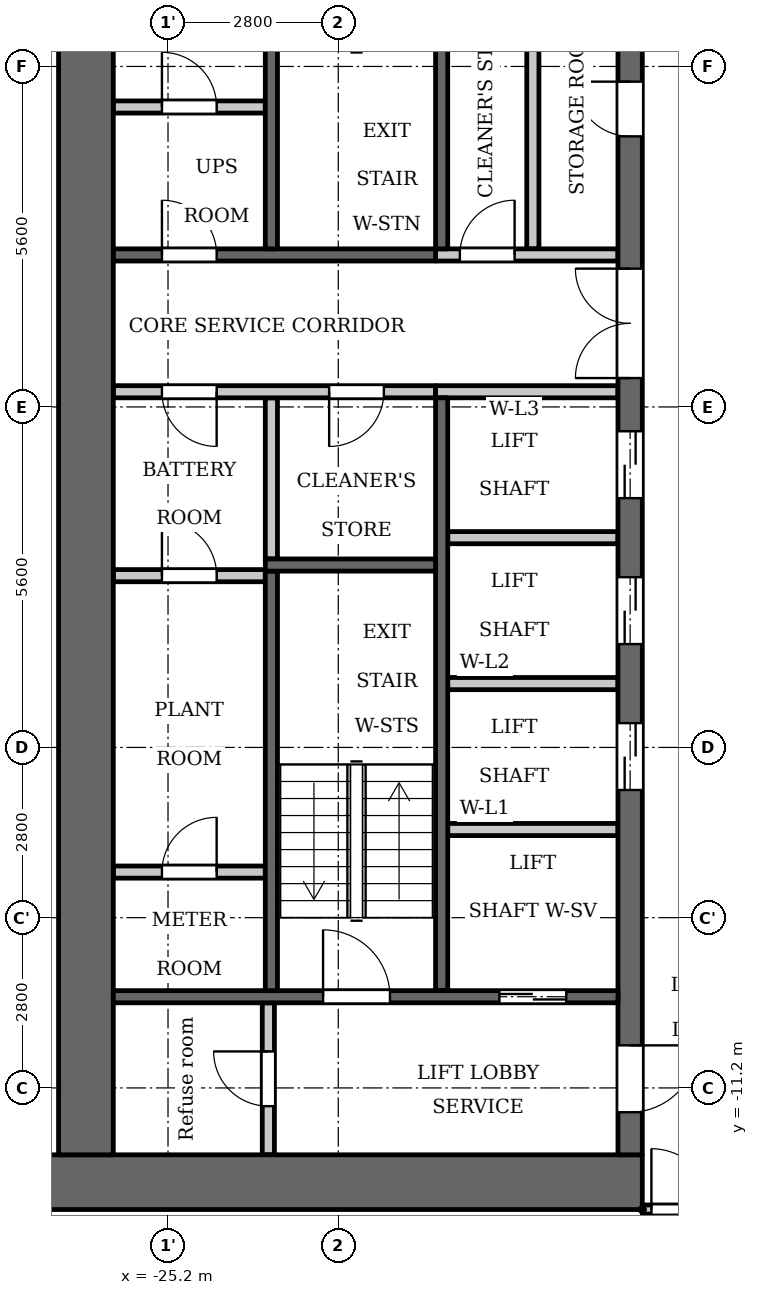
"""IFC4 building model, lengths in metres.
Left out: names, types, materials, properties, quantities, classifications, styles, units other than length and angle.
Written with IfcOpenShell. Run it as: python <this file> out.ifc"""

import sys

from ifc_helpers import new_model, si_unit, direction, frame, frame_2d, origin, place, context, subcontext, project, spatial, rectangle, extrude, element, fill, save


model = new_model("IFC4")
c1 = context("Model", 3, precision=1e-05, world=origin(), true_north=direction((0.0, 1.0)))
c2 = subcontext(c1, "Body", "Model", "MODEL_VIEW")
j1 = project(units=[si_unit("LENGTHUNIT", "METRE"), si_unit("PLANEANGLEUNIT", "RADIAN")], contexts=[c1])
p1 = place(None, origin())
s1 = spatial("IfcSite", under=j1, at=p1, CompositionType="ELEMENT")
p2 = place(p1, origin())
s2 = spatial("IfcBuilding", under=s1, at=p2, CompositionType="ELEMENT")
p3 = place(p2, frame((0.0, 0.0, 90.3)))
s3 = spatial("IfcBuildingStorey", under=s2, at=p3, CompositionType="ELEMENT", Elevation=90.3)
p4 = place(p3, frame((-23.5, -2.5, 0.0), z_axis=(0.0, 0.0, 1.0), x_axis=(0.0, 1.0, 0.0)))
e1 = element("IfcWall", 1, at=p4, inside=s3, PredefinedType="PARTITIONING", context=c2, shape_type="SweptSolid", body=[
    extrude(rectangle(XDim=2.65, YDim=0.2, at=frame_2d((1.325, 0.0))), origin(), (0.0, 0.0, 1.0), 3.2),
])
p5 = place(p3, frame((-20.7, 2.6, 0.0), z_axis=(0.0, 0.0, 1.0), x_axis=(0.0, 1.0, 0.0)))
e2 = element("IfcWall", 2, at=p5, inside=s3, PredefinedType="SHEAR", context=c2, shape_type="SweptSolid", body=[
    extrude(rectangle(XDim=7.0, YDim=0.2, at=frame_2d((3.5, 0.0))), origin(), (0.0, 0.0, 1.0), 3.2),
])
p6 = place(p3, frame((-20.7, -9.6, 0.0), z_axis=(0.0, 0.0, 1.0), x_axis=(0.0, 1.0, 0.0)))
e3 = element("IfcWall", 3, at=p6, inside=s3, PredefinedType="SHEAR", context=c2, shape_type="SweptSolid", body=[
    extrude(rectangle(XDim=9.75, YDim=0.2, at=frame_2d((4.875, 0.0))), origin(), (0.0, 0.0, 1.0), 3.2),
])
p7 = place(p3, frame((-20.8, 2.5, 0.0), z_axis=(0.0, 0.0, 1.0), x_axis=(-1.0, 0.0, 0.0)))
e4 = element("IfcWall", 4, at=p7, inside=s3, PredefinedType="SHEAR", context=c2, shape_type="SweptSolid", body=[
    extrude(rectangle(XDim=5.3, YDim=0.2, at=frame_2d((2.65, 0.0))), origin(), (0.0, 0.0, 1.0), 3.2),
])
p8 = place(p7, frame((3.6, 0.0, 0.0)))
e5 = element("IfcOpeningElement", 5, at=p8, cuts=e4, PredefinedType="OPENING", context=c2, shape_type="SweptSolid", body=[
    extrude(rectangle(XDim=0.9, YDim=2.1, at=frame_2d((0.45, 1.05))), frame((0.0, 0.11, 0.0), z_axis=(0.0, -1.0, 0.0), x_axis=(1.0, 0.0, 0.0)), (0.0, 0.0, 1.0), 0.22),
])
p9 = place(p3, frame((-20.8, 0.25, 0.0), z_axis=(0.0, 0.0, 1.0), x_axis=(-1.0, 0.0, 0.0)))
e6 = element("IfcWall", 6, at=p9, inside=s3, PredefinedType="PARTITIONING", context=c2, shape_type="SweptSolid", body=[
    extrude(rectangle(XDim=5.3, YDim=0.2, at=frame_2d((2.65, 0.0))), origin(), (0.0, 0.0, 1.0), 3.2),
])
p10 = place(p9, frame((0.85, 0.0, 0.0)))
e7 = element("IfcOpeningElement", 7, at=p10, cuts=e6, PredefinedType="OPENING", context=c2, shape_type="SweptSolid", body=[
    extrude(rectangle(XDim=0.9, YDim=2.1, at=frame_2d((0.45, 1.05))), frame((0.0, 0.11, 0.0), z_axis=(0.0, -1.0, 0.0), x_axis=(1.0, 0.0, 0.0)), (0.0, 0.0, 1.0), 0.22),
])
p11 = place(p9, frame((3.6, 0.0, 0.0)))
e8 = element("IfcOpeningElement", 8, at=p11, cuts=e6, PredefinedType="OPENING", context=c2, shape_type="SweptSolid", body=[
    extrude(rectangle(XDim=0.9, YDim=2.1, at=frame_2d((0.45, 1.05))), frame((0.0, 0.11, 0.0), z_axis=(0.0, -1.0, 0.0), x_axis=(1.0, 0.0, 0.0)), (0.0, 0.0, 1.0), 0.22),
])
p12 = place(p3, frame((-17.4, -12.75, 0.0), z_axis=(0.0, 0.0, 1.0), x_axis=(-1.0, 0.0, 0.0)))
e9 = element("IfcWall", 9, at=p12, inside=s3, PredefinedType="SHEAR", context=c2, shape_type="SweptSolid", body=[
    extrude(rectangle(XDim=10.4, YDim=0.9, at=frame_2d((5.2, 0.0))), origin(), (0.0, 0.0, 1.0), 3.2),
])
p13 = place(p3, frame((-19.2, 2.6, 0.0), z_axis=(0.0, 0.0, 1.0), x_axis=(0.0, 1.0, 0.0)))
e10 = element("IfcWall", 10, at=p13, inside=s3, PredefinedType="PARTITIONING", context=c2, shape_type="SweptSolid", body=[
    extrude(rectangle(XDim=4.6, YDim=0.2, at=frame_2d((2.3, 0.0))), origin(), (0.0, 0.0, 1.0), 3.2),
])
p14 = place(p3, frame((-17.6, -12.3, 0.0), z_axis=(0.0, 0.0, 1.0), x_axis=(0.0, 1.0, 0.0)))
e11 = element("IfcWall", 11, at=p14, inside=s3, PredefinedType="SHEAR", context=c2, shape_type="SweptSolid", body=[
    extrude(rectangle(XDim=24.6, YDim=0.4, at=frame_2d((12.3, 0.0))), origin(), (0.0, 0.0, 1.0), 3.2),
])
p15 = place(p14, frame((6.0, 0.0, 0.0)))
e12 = element("IfcOpeningElement", 12, at=p15, cuts=e11, PredefinedType="OPENING", context=c2, shape_type="SweptSolid", body=[
    extrude(rectangle(XDim=1.1, YDim=2.1, at=frame_2d((0.55, 1.05))), frame((0.0, 0.21, 0.0), z_axis=(0.0, -1.0, 0.0), x_axis=(1.0, 0.0, 0.0)), (0.0, 0.0, 1.0), 0.42),
])
p16 = place(p14, frame((8.4, 0.0, 0.0)))
e13 = element("IfcOpeningElement", 13, at=p16, cuts=e11, PredefinedType="OPENING", context=c2, shape_type="SweptSolid", body=[
    extrude(rectangle(XDim=1.1, YDim=2.1, at=frame_2d((0.55, 1.05))), frame((0.0, 0.21, 0.0), z_axis=(0.0, -1.0, 0.0), x_axis=(1.0, 0.0, 0.0)), (0.0, 0.0, 1.0), 0.42),
])
p17 = place(p14, frame((10.8, 0.0, 0.0)))
e14 = element("IfcOpeningElement", 14, at=p17, cuts=e11, PredefinedType="OPENING", context=c2, shape_type="SweptSolid", body=[
    extrude(rectangle(XDim=1.1, YDim=2.1, at=frame_2d((0.55, 1.05))), frame((0.0, 0.21, 0.0), z_axis=(0.0, -1.0, 0.0), x_axis=(1.0, 0.0, 0.0)), (0.0, 0.0, 1.0), 0.42),
])
p18 = place(p14, frame((16.75, 0.0, 0.0)))
e15 = element("IfcOpeningElement", 15, at=p18, cuts=e11, PredefinedType="OPENING", context=c2, shape_type="SweptSolid", body=[
    extrude(rectangle(XDim=0.9, YDim=2.1, at=frame_2d((0.45, 1.05))), frame((0.0, 0.21, 0.0), z_axis=(0.0, -1.0, 0.0), x_axis=(1.0, 0.0, 0.0)), (0.0, 0.0, 1.0), 0.42),
])
p19 = place(p14, frame((22.8, 0.0, 0.0)))
e16 = element("IfcOpeningElement", 16, at=p19, cuts=e11, PredefinedType="OPENING", context=c2, shape_type="SweptSolid", body=[
    extrude(rectangle(XDim=1.1, YDim=2.1, at=frame_2d((0.55, 1.05))), frame((0.0, 0.21, 0.0), z_axis=(0.0, -1.0, 0.0), x_axis=(1.0, 0.0, 0.0)), (0.0, 0.0, 1.0), 0.42),
])
p20 = place(p14, frame((0.7, 0.0, 0.0)))
e17 = element("IfcOpeningElement", 17, at=p20, cuts=e11, PredefinedType="OPENING", context=c2, shape_type="SweptSolid", body=[
    extrude(rectangle(XDim=1.1, YDim=2.1, at=frame_2d((0.55, 1.05))), frame((0.0, 0.21, 0.0), z_axis=(0.0, -1.0, 0.0), x_axis=(1.0, 0.0, 0.0)), (0.0, 0.0, 1.0), 0.42),
])
p21 = place(p14, frame((12.775, 0.0, 0.0)))
e18 = element("IfcOpeningElement", 18, at=p21, cuts=e11, PredefinedType="OPENING", context=c2, shape_type="SweptSolid", body=[
    extrude(rectangle(XDim=1.8, YDim=2.1, at=frame_2d((0.9, 1.05))), frame((0.0, 0.21, 0.0), z_axis=(0.0, -1.0, 0.0), x_axis=(1.0, 0.0, 0.0)), (0.0, 0.0, 1.0), 0.42),
])
p22 = place(p3, frame((-26.55, -12.3, 0.0), z_axis=(0.0, 0.0, 1.0), x_axis=(0.0, 1.0, 0.0)))
e19 = element("IfcWall", 19, at=p22, inside=s3, PredefinedType="SHEAR", context=c2, shape_type="SweptSolid", body=[
    extrude(rectangle(XDim=24.6, YDim=0.9, at=frame_2d((12.3, 0.0))), origin(), (0.0, 0.0, 1.0), 3.2),
])
p23 = place(p3, frame((-23.55, -12.3, 0.0), z_axis=(0.0, 0.0, 1.0), x_axis=(0.0, 1.0, 0.0)))
e20 = element("IfcWall", 20, at=p23, inside=s3, PredefinedType="PARTITIONING", context=c2, shape_type="SweptSolid", body=[
    extrude(rectangle(XDim=2.5, YDim=0.2, at=frame_2d((1.25, 0.0))), origin(), (0.0, 0.0, 1.0), 3.2),
])
p24 = place(p23, frame((0.8, 0.0, 0.0)))
e21 = element("IfcOpeningElement", 21, at=p24, cuts=e20, PredefinedType="OPENING", context=c2, shape_type="SweptSolid", body=[
    extrude(rectangle(XDim=0.9, YDim=2.1, at=frame_2d((0.45, 1.05))), frame((0.0, 0.11, 0.0), z_axis=(0.0, -1.0, 0.0), x_axis=(1.0, 0.0, 0.0)), (0.0, 0.0, 1.0), 0.22),
])
p25 = place(p3, frame((-23.6, -7.65, 0.0), z_axis=(0.0, 0.0, 1.0), x_axis=(-1.0, 0.0, 0.0)))
e22 = element("IfcWall", 22, at=p25, inside=s3, PredefinedType="PARTITIONING", context=c2, shape_type="SweptSolid", body=[
    extrude(rectangle(XDim=2.5, YDim=0.2, at=frame_2d((1.25, 0.0))), origin(), (0.0, 0.0, 1.0), 3.2),
])
p26 = place(p25, frame((0.8, 0.0, 0.0)))
e23 = element("IfcOpeningElement", 23, at=p26, cuts=e22, PredefinedType="OPENING", context=c2, shape_type="SweptSolid", body=[
    extrude(rectangle(XDim=0.9, YDim=2.1, at=frame_2d((0.45, 1.05))), frame((0.0, 0.11, 0.0), z_axis=(0.0, -1.0, 0.0), x_axis=(1.0, 0.0, 0.0)), (0.0, 0.0, 1.0), 0.22),
])
p27 = place(p3, frame((-23.6, -2.775, 0.0), z_axis=(0.0, 0.0, 1.0), x_axis=(-1.0, 0.0, 0.0)))
e24 = element("IfcWall", 24, at=p27, inside=s3, PredefinedType="PARTITIONING", context=c2, shape_type="SweptSolid", body=[
    extrude(rectangle(XDim=2.5, YDim=0.2, at=frame_2d((1.25, 0.0))), origin(), (0.0, 0.0, 1.0), 3.2),
])
p28 = place(p27, frame((0.8, 0.0, 0.0)))
e25 = element("IfcOpeningElement", 25, at=p28, cuts=e24, PredefinedType="OPENING", context=c2, shape_type="SweptSolid", body=[
    extrude(rectangle(XDim=0.9, YDim=2.1, at=frame_2d((0.45, 1.05))), frame((0.0, 0.11, 0.0), z_axis=(0.0, -1.0, 0.0), x_axis=(1.0, 0.0, 0.0)), (0.0, 0.0, 1.0), 0.22),
])
p29 = place(p3, frame((-23.6, 4.933, 0.0), z_axis=(0.0, 0.0, 1.0), x_axis=(-1.0, 0.0, 0.0)))
e26 = element("IfcWall", 26, at=p29, inside=s3, PredefinedType="PARTITIONING", context=c2, shape_type="SweptSolid", body=[
    extrude(rectangle(XDim=2.5, YDim=0.2, at=frame_2d((1.25, 0.0))), origin(), (0.0, 0.0, 1.0), 3.2),
])
p30 = place(p29, frame((0.8, 0.0, 0.0)))
e27 = element("IfcOpeningElement", 27, at=p30, cuts=e26, PredefinedType="OPENING", context=c2, shape_type="SweptSolid", body=[
    extrude(rectangle(XDim=0.9, YDim=2.1, at=frame_2d((0.45, 1.05))), frame((0.0, 0.11, 0.0), z_axis=(0.0, -1.0, 0.0), x_axis=(1.0, 0.0, 0.0)), (0.0, 0.0, 1.0), 0.22),
])
p31 = place(p3, frame((-17.8, -9.7, 0.0), z_axis=(0.0, 0.0, 1.0), x_axis=(-1.0, 0.0, 0.0)))
e28 = element("IfcWall", 28, at=p31, inside=s3, PredefinedType="SHEAR", context=c2, shape_type="SweptSolid", body=[
    extrude(rectangle(XDim=8.3, YDim=0.2, at=frame_2d((4.15, 0.0))), origin(), (0.0, 0.0, 1.0), 3.2),
])
p32 = place(p31, frame((0.85, 0.0, 0.0)))
e29 = element("IfcOpeningElement", 29, at=p32, cuts=e28, PredefinedType="OPENING", context=c2, shape_type="SweptSolid", body=[
    extrude(rectangle(XDim=1.1, YDim=2.1, at=frame_2d((0.55, 1.05))), frame((0.0, 0.11, 0.0), z_axis=(0.0, -1.0, 0.0), x_axis=(1.0, 0.0, 0.0)), (0.0, 0.0, 1.0), 0.22),
])
p33 = place(p31, frame((3.75, 0.0, 0.0)))
e30 = element("IfcOpeningElement", 30, at=p33, cuts=e28, PredefinedType="OPENING", context=c2, shape_type="SweptSolid", body=[
    extrude(rectangle(XDim=1.1, YDim=2.1, at=frame_2d((0.55, 1.05))), frame((0.0, 0.11, 0.0), z_axis=(0.0, -1.0, 0.0), x_axis=(1.0, 0.0, 0.0)), (0.0, 0.0, 1.0), 0.22),
])
for number, where, z_axis, x_axis in (
    (31, (-17.8, -6.95, 0.0), (0.0, 0.0, 1.0), (-1.0, 0.0, 0.0)),
    (32, (-17.8, -4.55, 0.0), (0.0, 0.0, 1.0), (-1.0, 0.0, 0.0)),
    (33, (-17.8, -2.15, 0.0), (0.0, 0.0, 1.0), (-1.0, 0.0, 0.0)),
):
    element("IfcWall", number, at=place(p3, frame(where, z_axis=z_axis, x_axis=x_axis)), inside=s3, PredefinedType="PARTITIONING", context=c2, shape_type="SweptSolid", body=[
        extrude(rectangle(XDim=2.8, YDim=0.2, at=frame_2d((1.4, 0.0))), origin(), (0.0, 0.0, 1.0), 3.2),
    ])
p34 = place(p3, frame((-17.8, 0.25, 0.0), z_axis=(0.0, 0.0, 1.0), x_axis=(-1.0, 0.0, 0.0)))
e34 = element("IfcWall", 34, at=p34, inside=s3, PredefinedType="PARTITIONING", context=c2, shape_type="SweptSolid", body=[
    extrude(rectangle(XDim=3.0, YDim=0.2, at=frame_2d((1.5, 0.0))), origin(), (0.0, 0.0, 1.0), 3.2),
])
p35 = place(p3, frame((-17.8, 2.5, 0.0), z_axis=(0.0, 0.0, 1.0), x_axis=(-1.0, 0.0, 0.0)))
e35 = element("IfcWall", 35, at=p35, inside=s3, PredefinedType="PARTITIONING", context=c2, shape_type="SweptSolid", body=[
    extrude(rectangle(XDim=3.0, YDim=0.2, at=frame_2d((1.5, 0.0))), origin(), (0.0, 0.0, 1.0), 3.2),
])
p36 = place(p35, frame((1.7, 0.0, 0.0)))
e36 = element("IfcOpeningElement", 36, at=p36, cuts=e35, PredefinedType="OPENING", context=c2, shape_type="SweptSolid", body=[
    extrude(rectangle(XDim=0.9, YDim=2.1, at=frame_2d((0.45, 1.05))), frame((0.0, 0.11, 0.0), z_axis=(0.0, -1.0, 0.0), x_axis=(1.0, 0.0, 0.0)), (0.0, 0.0, 1.0), 0.22),
])
p37 = place(p3, frame((-23.5, 2.6, 0.0), z_axis=(0.0, 0.0, 1.0), x_axis=(0.0, 1.0, 0.0)))
e37 = element("IfcWall", 37, at=p37, inside=s3, PredefinedType="SHEAR", context=c2, shape_type="SweptSolid", body=[
    extrude(rectangle(XDim=7.0, YDim=0.2, at=frame_2d((3.5, 0.0))), origin(), (0.0, 0.0, 1.0), 3.2),
])
p38 = place(p3, frame((-23.5, -9.6, 0.0), z_axis=(0.0, 0.0, 1.0), x_axis=(0.0, 1.0, 0.0)))
e38 = element("IfcWall", 38, at=p38, inside=s3, PredefinedType="SHEAR", context=c2, shape_type="SweptSolid", body=[
    extrude(rectangle(XDim=6.9, YDim=0.2, at=frame_2d((3.45, 0.0))), origin(), (0.0, 0.0, 1.0), 3.2),
])
p39 = place(p3, frame((-20.8, -2.6, 0.0), z_axis=(0.0, 0.0, 1.0), x_axis=(-1.0, 0.0, 0.0)))
e39 = element("IfcWall", 39, at=p39, inside=s3, PredefinedType="SHEAR", context=c2, shape_type="SweptSolid", body=[
    extrude(rectangle(XDim=2.8, YDim=0.2, at=frame_2d((1.4, 0.0))), origin(), (0.0, 0.0, 1.0), 3.2),
])
p40 = place(p3, frame((-17.4, -13.2, 0.0), z_axis=(0.0, 0.0, 1.0), x_axis=(1.0, 0.0, 0.0)))
e40 = element("IfcWall", 40, at=p40, inside=s3, PredefinedType="PARTITIONING", context=c2, shape_type="SweptSolid", body=[
    extrude(rectangle(XDim=34.8, YDim=0.15, at=frame_2d((17.4, 0.0))), origin(), (0.0, 0.0, 1.0), 3.2),
])
p41 = place(p40, frame((0.15, 0.0, 0.0)))
e41 = element("IfcOpeningElement", 41, at=p41, cuts=e40, PredefinedType="OPENING", context=c2, shape_type="SweptSolid", body=[
    extrude(rectangle(XDim=1.0, YDim=2.1, at=frame_2d((0.5, 1.05))), frame((0.0, 0.085, 0.0), z_axis=(0.0, -1.0, 0.0), x_axis=(1.0, 0.0, 0.0)), (0.0, 0.0, 1.0), 0.17),
])
p42 = place(p40, frame((33.55, 0.0, 0.0)))
e42 = element("IfcOpeningElement", 42, at=p42, cuts=e40, PredefinedType="OPENING", context=c2, shape_type="SweptSolid", body=[
    extrude(rectangle(XDim=1.0, YDim=2.1, at=frame_2d((0.5, 1.05))), frame((0.0, 0.085, 0.0), z_axis=(0.0, -1.0, 0.0), x_axis=(1.0, 0.0, 0.0)), (0.0, 0.0, 1.0), 0.17),
])
p43 = place(p40, frame((7.35, 0.0, 0.0)))
e43 = element("IfcOpeningElement", 43, at=p43, cuts=e40, PredefinedType="OPENING", context=c2, shape_type="SweptSolid", body=[
    extrude(rectangle(XDim=1.0, YDim=2.1, at=frame_2d((0.5, 1.05))), frame((0.0, 0.085, 0.0), z_axis=(0.0, -1.0, 0.0), x_axis=(1.0, 0.0, 0.0)), (0.0, 0.0, 1.0), 0.17),
])
p44 = place(p40, frame((13.7, 0.0, 0.0)))
e44 = element("IfcOpeningElement", 44, at=p44, cuts=e40, PredefinedType="OPENING", context=c2, shape_type="SweptSolid", body=[
    extrude(rectangle(XDim=1.0, YDim=2.1, at=frame_2d((0.5, 1.05))), frame((0.0, 0.085, 0.0), z_axis=(0.0, -1.0, 0.0), x_axis=(1.0, 0.0, 0.0)), (0.0, 0.0, 1.0), 0.17),
])
p45 = place(p40, frame((19.3, 0.0, 0.0)))
e45 = element("IfcOpeningElement", 45, at=p45, cuts=e40, PredefinedType="OPENING", context=c2, shape_type="SweptSolid", body=[
    extrude(rectangle(XDim=1.0, YDim=2.1, at=frame_2d((0.5, 1.05))), frame((0.0, 0.085, 0.0), z_axis=(0.0, -1.0, 0.0), x_axis=(1.0, 0.0, 0.0)), (0.0, 0.0, 1.0), 0.17),
])
p46 = place(p32, origin())
e46 = element("IfcDoor", 46, at=p46, inside=s3, OperationType="DOUBLE_DOOR_SLIDING", PredefinedType="DOOR", context=c2, shape_type="SweptSolid", body=[
    extrude(rectangle(XDim=1.1, YDim=2.1, at=frame_2d((0.55, 1.05))), frame((0.0, 0.025, 0.0), z_axis=(0.0, -1.0, 0.0), x_axis=(1.0, 0.0, 0.0)), (0.0, 0.0, 1.0), 0.05),
])
fill(e29, e46)
p47 = place(p15, origin())
e47 = element("IfcDoor", 47, at=p47, inside=s3, OperationType="DOUBLE_DOOR_SLIDING", PredefinedType="DOOR", context=c2, shape_type="SweptSolid", body=[
    extrude(rectangle(XDim=1.1, YDim=2.1, at=frame_2d((0.55, 1.05))), frame((0.0, 0.025, 0.0), z_axis=(0.0, -1.0, 0.0), x_axis=(1.0, 0.0, 0.0)), (0.0, 0.0, 1.0), 0.05),
])
fill(e12, e47)
p48 = place(p16, origin())
e48 = element("IfcDoor", 48, at=p48, inside=s3, OperationType="DOUBLE_DOOR_SLIDING", PredefinedType="DOOR", context=c2, shape_type="SweptSolid", body=[
    extrude(rectangle(XDim=1.1, YDim=2.1, at=frame_2d((0.55, 1.05))), frame((0.0, 0.025, 0.0), z_axis=(0.0, -1.0, 0.0), x_axis=(1.0, 0.0, 0.0)), (0.0, 0.0, 1.0), 0.05),
])
fill(e13, e48)
p49 = place(p17, origin())
e49 = element("IfcDoor", 49, at=p49, inside=s3, OperationType="DOUBLE_DOOR_SLIDING", PredefinedType="DOOR", context=c2, shape_type="SweptSolid", body=[
    extrude(rectangle(XDim=1.1, YDim=2.1, at=frame_2d((0.55, 1.05))), frame((0.0, 0.025, 0.0), z_axis=(0.0, -1.0, 0.0), x_axis=(1.0, 0.0, 0.0)), (0.0, 0.0, 1.0), 0.05),
])
fill(e14, e49)
p50 = place(p18, origin())
e50 = element("IfcDoor", 50, at=p50, inside=s3, OperationType="SINGLE_SWING_LEFT", PredefinedType="DOOR", context=c2, shape_type="SweptSolid", body=[
    extrude(rectangle(XDim=0.9, YDim=2.1, at=frame_2d((0.45, 1.05))), frame((0.0, 0.025, 0.0), z_axis=(0.0, -1.0, 0.0), x_axis=(1.0, 0.0, 0.0)), (0.0, 0.0, 1.0), 0.05),
])
fill(e15, e50)
p51 = place(p36, origin())
e51 = element("IfcDoor", 51, at=p51, inside=s3, OperationType="SINGLE_SWING_LEFT", PredefinedType="DOOR", context=c2, shape_type="SweptSolid", body=[
    extrude(rectangle(XDim=0.9, YDim=2.1, at=frame_2d((0.45, 1.05))), frame((0.0, 0.025, 0.0), z_axis=(0.0, -1.0, 0.0), x_axis=(1.0, 0.0, 0.0)), (0.0, 0.0, 1.0), 0.05),
])
fill(e36, e51)
p52 = place(p20, origin())
e52 = element("IfcDoor", 52, at=p52, inside=s3, OperationType="SINGLE_SWING_RIGHT", PredefinedType="DOOR", context=c2, shape_type="SweptSolid", body=[
    extrude(rectangle(XDim=1.1, YDim=2.1, at=frame_2d((0.55, 1.05))), frame((0.0, 0.025, 0.0), z_axis=(0.0, -1.0, 0.0), x_axis=(1.0, 0.0, 0.0)), (0.0, 0.0, 1.0), 0.05),
])
fill(e17, e52)
p53 = place(p24, origin())
e53 = element("IfcDoor", 53, at=p53, inside=s3, OperationType="SINGLE_SWING_LEFT", PredefinedType="DOOR", context=c2, shape_type="SweptSolid", body=[
    extrude(rectangle(XDim=0.9, YDim=2.1, at=frame_2d((0.45, 1.05))), frame((0.0, 0.025, 0.0), z_axis=(0.0, -1.0, 0.0), x_axis=(1.0, 0.0, 0.0)), (0.0, 0.0, 1.0), 0.05),
])
fill(e21, e53)
p54 = place(p33, origin())
e54 = element("IfcDoor", 54, at=p54, inside=s3, OperationType="SINGLE_SWING_RIGHT", PredefinedType="DOOR", context=c2, shape_type="SweptSolid", body=[
    extrude(rectangle(XDim=1.1, YDim=2.1, at=frame_2d((0.55, 1.05))), frame((0.0, 0.025, 0.0), z_axis=(0.0, -1.0, 0.0), x_axis=(1.0, 0.0, 0.0)), (0.0, 0.0, 1.0), 0.05),
])
fill(e30, e54)
p55 = place(p21, origin())
e55 = element("IfcDoor", 55, at=p55, inside=s3, OperationType="DOUBLE_DOOR_SINGLE_SWING", PredefinedType="DOOR", context=c2, shape_type="SweptSolid", body=[
    extrude(rectangle(XDim=1.8, YDim=2.1, at=frame_2d((0.9, 1.05))), frame((0.0, 0.025, 0.0), z_axis=(0.0, -1.0, 0.0), x_axis=(1.0, 0.0, 0.0)), (0.0, 0.0, 1.0), 0.05),
])
fill(e18, e55)
p56 = place(p10, origin())
e56 = element("IfcDoor", 56, at=p56, inside=s3, OperationType="SINGLE_SWING_LEFT", PredefinedType="DOOR", context=c2, shape_type="SweptSolid", body=[
    extrude(rectangle(XDim=0.9, YDim=2.1, at=frame_2d((0.45, 1.05))), frame((0.0, 0.025, 0.0), z_axis=(0.0, -1.0, 0.0), x_axis=(1.0, 0.0, 0.0)), (0.0, 0.0, 1.0), 0.05),
])
fill(e7, e56)
p57 = place(p26, origin())
e57 = element("IfcDoor", 57, at=p57, inside=s3, OperationType="SINGLE_SWING_LEFT", PredefinedType="DOOR", context=c2, shape_type="SweptSolid", body=[
    extrude(rectangle(XDim=0.9, YDim=2.1, at=frame_2d((0.45, 1.05))), frame((0.0, 0.025, 0.0), z_axis=(0.0, -1.0, 0.0), x_axis=(1.0, 0.0, 0.0)), (0.0, 0.0, 1.0), 0.05),
])
fill(e23, e57)
p58 = place(p28, origin())
e58 = element("IfcDoor", 58, at=p58, inside=s3, OperationType="SINGLE_SWING_RIGHT", PredefinedType="DOOR", context=c2, shape_type="SweptSolid", body=[
    extrude(rectangle(XDim=0.9, YDim=2.1, at=frame_2d((0.45, 1.05))), frame((0.0, 0.025, 0.0), z_axis=(0.0, -1.0, 0.0), x_axis=(1.0, 0.0, 0.0)), (0.0, 0.0, 1.0), 0.05),
])
fill(e25, e58)
p59 = place(p11, origin())
e59 = element("IfcDoor", 59, at=p59, inside=s3, OperationType="SINGLE_SWING_RIGHT", PredefinedType="DOOR", context=c2, shape_type="SweptSolid", body=[
    extrude(rectangle(XDim=0.9, YDim=2.1, at=frame_2d((0.45, 1.05))), frame((0.0, 0.025, 0.0), z_axis=(0.0, -1.0, 0.0), x_axis=(1.0, 0.0, 0.0)), (0.0, 0.0, 1.0), 0.05),
])
fill(e8, e59)
p60 = place(p30, origin())
e60 = element("IfcDoor", 60, at=p60, inside=s3, OperationType="SINGLE_SWING_RIGHT", PredefinedType="DOOR", context=c2, shape_type="SweptSolid", body=[
    extrude(rectangle(XDim=0.9, YDim=2.1, at=frame_2d((0.45, 1.05))), frame((0.0, 0.025, 0.0), z_axis=(0.0, -1.0, 0.0), x_axis=(1.0, 0.0, 0.0)), (0.0, 0.0, 1.0), 0.05),
])
fill(e27, e60)
p61 = place(p8, origin())
e61 = element("IfcDoor", 61, at=p61, inside=s3, OperationType="SINGLE_SWING_RIGHT", PredefinedType="DOOR", context=c2, shape_type="SweptSolid", body=[
    extrude(rectangle(XDim=0.9, YDim=2.1, at=frame_2d((0.45, 1.05))), frame((0.0, 0.025, 0.0), z_axis=(0.0, -1.0, 0.0), x_axis=(1.0, 0.0, 0.0)), (0.0, 0.0, 1.0), 0.05),
])
fill(e5, e61)
p62 = place(p41, origin())
e62 = element("IfcDoor", 62, at=p62, inside=s3, OperationType="SINGLE_SWING_RIGHT", PredefinedType="DOOR", context=c2, shape_type="SweptSolid", body=[
    extrude(rectangle(XDim=1.0, YDim=2.1, at=frame_2d((0.5, 1.05))), frame((0.0, 0.025, 0.0), z_axis=(0.0, -1.0, 0.0), x_axis=(1.0, 0.0, 0.0)), (0.0, 0.0, 1.0), 0.05),
])
fill(e41, e62)
save(model, sys.argv[1])
